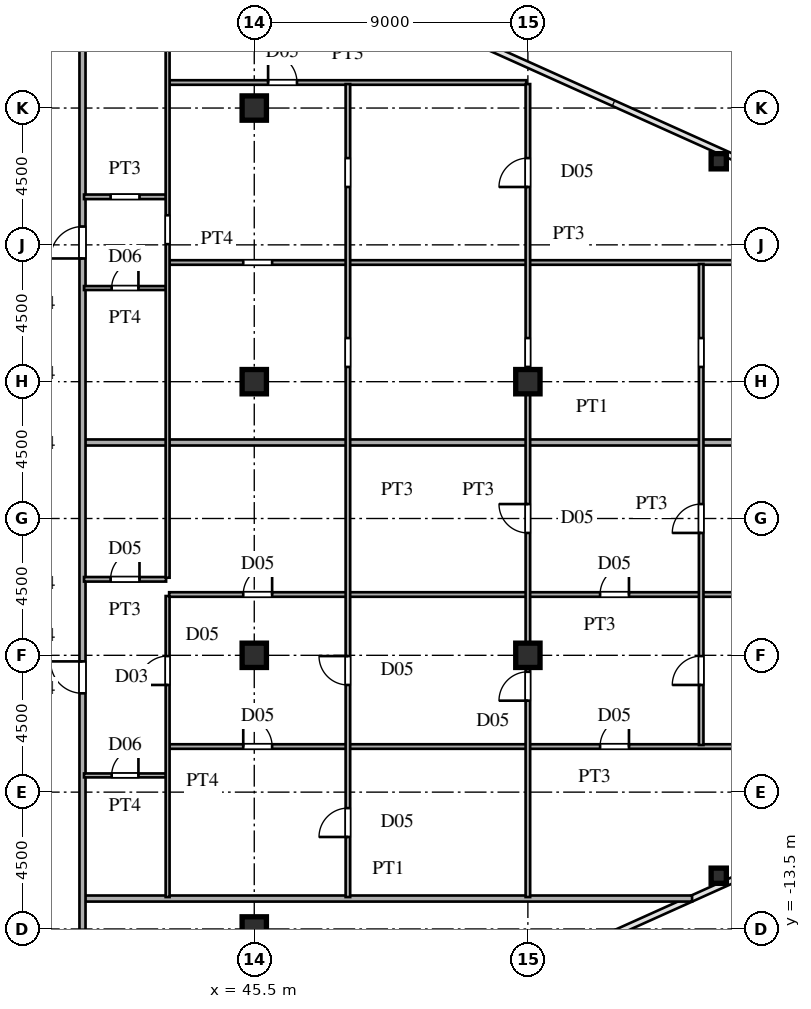
"""IFC4 building model, lengths in metres.
Left out: names, types, materials, properties, quantities, classifications, styles, units other than length and angle.
Written with IfcOpenShell. Run it as: python <this file> out.ifc"""

import sys

from ifc_helpers import new_model, si_unit, direction, frame, frame_2d, origin, origin_2d, place, context, subcontext, project, spatial, rectangle, hollow_rectangle, i_section, extrude, source, transform, mapped, element, fill, save


model = new_model("IFC4")
c1 = context("Model", 3, precision=1e-05, world=origin(), true_north=direction((0.0, 1.0)))
c2 = subcontext(c1, "Body", "Model", "MODEL_VIEW")
j1 = project(units=[si_unit("LENGTHUNIT", "METRE"), si_unit("PLANEANGLEUNIT", "RADIAN")], contexts=[c1])
p1 = place(None, origin())
s1 = spatial("IfcSite", under=j1, at=p1, CompositionType="ELEMENT")
p2 = place(p1, origin())
s2 = spatial("IfcBuilding", under=s1, at=p2, CompositionType="ELEMENT")
p3 = place(p2, frame((0.0, 0.0, 99.6)))
s3 = spatial("IfcBuildingStorey", under=s2, at=p3, CompositionType="ELEMENT", Elevation=99.6)
m1 = source(origin(), c2, "Body", "SweptSolid", [
    extrude(i_section(OverallWidth=0.8, OverallDepth=0.8, WebThickness=0.032, FlangeThickness=0.05, at=origin_2d()), origin(), (0.0, 0.0, 1.0), 3.6),
])
for number, where, z_axis, x_axis in (
    (1, (45.5, -13.5, 0.0), (0.0, 0.0, 1.0), (1.0, 0.0, 0.0)),
    (2, (45.5, -4.5, 0.0), (0.0, 0.0, 1.0), (1.0, 0.0, 0.0)),
    (3, (45.5, 4.5, 0.0), (0.0, 0.0, 1.0), (1.0, 0.0, 0.0)),
    (4, (45.5, 13.5, 0.0), (0.0, 0.0, 1.0), (1.0, 0.0, 0.0)),
    (5, (54.5, -4.5, 0.0), (0.0, 0.0, 1.0), (1.0, 0.0, 0.0)),
    (6, (54.5, 4.5, 0.0), (0.0, 0.0, 1.0), (1.0, 0.0, 0.0)),
):
    element("IfcColumn", number, at=place(p3, frame(where, z_axis=z_axis, x_axis=x_axis)), inside=s3, PredefinedType="COLUMN", context=c2, shape_type="MappedRepresentation", body=[
        mapped(m1, transform((0.0, 0.0, 0.0), scale=1.0)),
    ])
m2 = source(origin(), c2, "Body", "SweptSolid", [
    extrude(hollow_rectangle(XDim=0.5, YDim=0.5, WallThickness=0.02, at=origin_2d()), origin(), (0.0, 0.0, 1.0), 3.6),
])
for number, where, z_axis, x_axis in (
    (7, (60.778, -11.749, 0.0), (0.0, 0.0, 1.0), (1.0, 0.0, 0.0)),
    (8, (60.778, 11.749, 0.0), (0.0, 0.0, 1.0), (1.0, 0.0, 0.0)),
):
    element("IfcColumn", number, at=place(p3, frame(where, z_axis=z_axis, x_axis=x_axis)), inside=s3, PredefinedType="COLUMN", context=c2, shape_type="MappedRepresentation", body=[
        mapped(m2, transform((0.0, 0.0, 0.0), scale=1.0)),
    ])
p4 = place(p3, frame((39.93, -12.5, 0.0), z_axis=(0.0, 0.0, 1.0), x_axis=(1.0, 0.0, 0.0)))
e9 = element("IfcWall", 9, at=p4, inside=s3, PredefinedType="PARTITIONING", context=c2, shape_type="SweptSolid", body=[
    extrude(rectangle(XDim=19.971, YDim=0.2, at=frame_2d((9.985, 0.0))), origin(), (0.0, 0.0, 1.0), 3.38),
])
p5 = place(p3, frame((39.9, -8.45, 0.0), z_axis=(0.0, 0.0, 1.0), x_axis=(1.0, 0.0, 0.0)))
e10 = element("IfcWall", 10, at=p5, inside=s3, PredefinedType="PARTITIONING", context=c2, shape_type="SweptSolid", body=[
    extrude(rectangle(XDim=2.7, YDim=0.13, at=frame_2d((1.35, 0.0))), origin(), (0.0, 0.0, 1.0), 3.38),
])
p6 = place(p5, frame((0.91, 0.0, 0.0)))
e11 = element("IfcOpeningElement", 11, at=p6, cuts=e10, PredefinedType="OPENING", context=c2, shape_type="SweptSolid", body=[
    extrude(rectangle(XDim=0.88, YDim=2.1, at=frame_2d((0.44, 1.05))), frame((0.0, 0.075, 0.0), z_axis=(0.0, -1.0, 0.0), x_axis=(1.0, 0.0, 0.0)), (0.0, 0.0, 1.0), 0.15),
])
p7 = place(p3, frame((42.7, -7.5, 0.0), z_axis=(0.0, 0.0, 1.0), x_axis=(1.0, 0.0, 0.0)))
e12 = element("IfcWall", 12, at=p7, inside=s3, PredefinedType="PARTITIONING", context=c2, shape_type="SweptSolid", body=[
    extrude(rectangle(XDim=27.995, YDim=0.15, at=frame_2d((13.998, 0.0))), origin(), (0.0, 0.0, 1.0), 3.38),
])
p8 = place(p7, frame((2.438, 0.0, 0.0)))
e13 = element("IfcOpeningElement", 13, at=p8, cuts=e12, PredefinedType="OPENING", context=c2, shape_type="SweptSolid", body=[
    extrude(rectangle(XDim=0.95, YDim=2.15, at=frame_2d((0.475, 1.075))), frame((0.0, 0.085, 0.0), z_axis=(0.0, -1.0, 0.0), x_axis=(1.0, 0.0, 0.0)), (0.0, 0.0, 1.0), 0.17),
])
p9 = place(p7, frame((14.175, 0.0, 0.0)))
e14 = element("IfcOpeningElement", 14, at=p9, cuts=e12, PredefinedType="OPENING", context=c2, shape_type="SweptSolid", body=[
    extrude(rectangle(XDim=0.95, YDim=2.15, at=frame_2d((0.475, 1.075))), frame((0.0, 0.085, 0.0), z_axis=(0.0, -1.0, 0.0), x_axis=(1.0, 0.0, 0.0)), (0.0, 0.0, 1.0), 0.17),
])
p10 = place(p3, frame((42.7, -2.5, 0.0), z_axis=(0.0, 0.0, 1.0), x_axis=(1.0, 0.0, 0.0)))
e15 = element("IfcWall", 15, at=p10, inside=s3, PredefinedType="PARTITIONING", context=c2, shape_type="SweptSolid", body=[
    extrude(rectangle(XDim=28.335, YDim=0.15, at=frame_2d((14.167, 0.0))), origin(), (0.0, 0.0, 1.0), 3.38),
])
p11 = place(p10, frame((2.438, 0.0, 0.0)))
e16 = element("IfcOpeningElement", 16, at=p11, cuts=e15, PredefinedType="OPENING", context=c2, shape_type="SweptSolid", body=[
    extrude(rectangle(XDim=0.95, YDim=2.15, at=frame_2d((0.475, 1.075))), frame((0.0, 0.085, 0.0), z_axis=(0.0, -1.0, 0.0), x_axis=(1.0, 0.0, 0.0)), (0.0, 0.0, 1.0), 0.17),
])
p12 = place(p10, frame((14.175, 0.0, 0.0)))
e17 = element("IfcOpeningElement", 17, at=p12, cuts=e15, PredefinedType="OPENING", context=c2, shape_type="SweptSolid", body=[
    extrude(rectangle(XDim=0.95, YDim=2.15, at=frame_2d((0.475, 1.075))), frame((0.0, 0.085, 0.0), z_axis=(0.0, -1.0, 0.0), x_axis=(1.0, 0.0, 0.0)), (0.0, 0.0, 1.0), 0.17),
])
p13 = place(p3, frame((39.9, -2.0, 0.0), z_axis=(0.0, 0.0, 1.0), x_axis=(1.0, 0.0, 0.0)))
e18 = element("IfcWall", 18, at=p13, inside=s3, PredefinedType="PARTITIONING", context=c2, shape_type="SweptSolid", body=[
    extrude(rectangle(XDim=2.7, YDim=0.15, at=frame_2d((1.35, 0.0))), origin(), (0.0, 0.0, 1.0), 3.38),
])
p14 = place(p13, frame((0.875, 0.0, 0.0)))
e19 = element("IfcOpeningElement", 19, at=p14, cuts=e18, PredefinedType="OPENING", context=c2, shape_type="SweptSolid", body=[
    extrude(rectangle(XDim=0.95, YDim=2.15, at=frame_2d((0.475, 1.075))), frame((0.0, 0.085, 0.0), z_axis=(0.0, -1.0, 0.0), x_axis=(1.0, 0.0, 0.0)), (0.0, 0.0, 1.0), 0.17),
])
p15 = place(p3, frame((39.93, 2.5, 0.0), z_axis=(0.0, 0.0, 1.0), x_axis=(1.0, 0.0, 0.0)))
e20 = element("IfcWall", 20, at=p15, inside=s3, PredefinedType="PARTITIONING", context=c2, shape_type="SweptSolid", body=[
    extrude(rectangle(XDim=31.075, YDim=0.2, at=frame_2d((15.538, 0.0))), origin(), (0.0, 0.0, 1.0), 3.38),
])
p16 = place(p3, frame((39.9, 7.58, 0.0), z_axis=(0.0, 0.0, 1.0), x_axis=(1.0, 0.0, 0.0)))
e21 = element("IfcWall", 21, at=p16, inside=s3, PredefinedType="PARTITIONING", context=c2, shape_type="SweptSolid", body=[
    extrude(rectangle(XDim=2.7, YDim=0.13, at=frame_2d((1.35, 0.0))), origin(), (0.0, 0.0, 1.0), 3.38),
])
p17 = place(p16, frame((0.91, 0.0, 0.0)))
e22 = element("IfcOpeningElement", 22, at=p17, cuts=e21, PredefinedType="OPENING", context=c2, shape_type="SweptSolid", body=[
    extrude(rectangle(XDim=0.88, YDim=2.1, at=frame_2d((0.44, 1.05))), frame((0.0, 0.075, 0.0), z_axis=(0.0, -1.0, 0.0), x_axis=(1.0, 0.0, 0.0)), (0.0, 0.0, 1.0), 0.15),
])
p18 = place(p3, frame((42.7, 8.42, 0.0), z_axis=(0.0, 0.0, 1.0), x_axis=(1.0, 0.0, 0.0)))
e23 = element("IfcWall", 23, at=p18, inside=s3, PredefinedType="PARTITIONING", context=c2, shape_type="SweptSolid", body=[
    extrude(rectangle(XDim=26.292, YDim=0.15, at=frame_2d((13.146, 0.0))), origin(), (0.0, 0.0, 1.0), 3.38),
])
p19 = place(p18, frame((2.438, 0.0, 0.0)))
e24 = element("IfcOpeningElement", 24, at=p19, cuts=e23, PredefinedType="OPENING", context=c2, shape_type="SweptSolid", body=[
    extrude(rectangle(XDim=0.95, YDim=2.15, at=frame_2d((0.475, 1.075))), frame((0.0, 0.085, 0.0), z_axis=(0.0, -1.0, 0.0), x_axis=(1.0, 0.0, 0.0)), (0.0, 0.0, 1.0), 0.17),
])
p20 = place(p3, frame((39.9, 10.58, 0.0), z_axis=(0.0, 0.0, 1.0), x_axis=(1.0, 0.0, 0.0)))
e25 = element("IfcWall", 25, at=p20, inside=s3, PredefinedType="PARTITIONING", context=c2, shape_type="SweptSolid", body=[
    extrude(rectangle(XDim=2.7, YDim=0.15, at=frame_2d((1.35, 0.0))), origin(), (0.0, 0.0, 1.0), 3.38),
])
p21 = place(p20, frame((0.875, 0.0, 0.0)))
e26 = element("IfcOpeningElement", 26, at=p21, cuts=e25, PredefinedType="OPENING", context=c2, shape_type="SweptSolid", body=[
    extrude(rectangle(XDim=0.95, YDim=2.15, at=frame_2d((0.475, 1.075))), frame((0.0, 0.085, 0.0), z_axis=(0.0, -1.0, 0.0), x_axis=(1.0, 0.0, 0.0)), (0.0, 0.0, 1.0), 0.17),
])
p22 = place(p3, frame((42.7, 14.34, 0.0), z_axis=(0.0, 0.0, 1.0), x_axis=(1.0, 0.0, 0.0)))
e27 = element("IfcWall", 27, at=p22, inside=s3, PredefinedType="PARTITIONING", context=c2, shape_type="SweptSolid", body=[
    extrude(rectangle(XDim=11.75, YDim=0.15, at=frame_2d((5.875, 0.0))), origin(), (0.0, 0.0, 1.0), 3.38),
])
p23 = place(p22, frame((3.255, 0.0, 0.0)))
e28 = element("IfcOpeningElement", 28, at=p23, cuts=e27, PredefinedType="OPENING", context=c2, shape_type="SweptSolid", body=[
    extrude(rectangle(XDim=0.95, YDim=2.15, at=frame_2d((0.475, 1.075))), frame((0.0, 0.085, 0.0), z_axis=(0.0, -1.0, 0.0), x_axis=(1.0, 0.0, 0.0)), (0.0, 0.0, 1.0), 0.17),
])
p24 = place(p3, frame((39.85, -15.515, 0.0), z_axis=(0.0, 0.0, 1.0), x_axis=(0.0, 1.0, 0.0)))
e29 = element("IfcWall", 29, at=p24, inside=s3, PredefinedType="PARTITIONING", context=c2, shape_type="SweptSolid", body=[
    extrude(rectangle(XDim=31.03, YDim=0.2, at=frame_2d((15.515, 0.0))), origin(), (0.0, 0.0, 1.0), 3.38),
])
p25 = place(p24, frame((0.94, 0.0, 0.0)))
e30 = element("IfcOpeningElement", 30, at=p25, cuts=e29, PredefinedType="OPENING", context=c2, shape_type="SweptSolid", body=[
    extrude(rectangle(XDim=1.05, YDim=2.25, at=frame_2d((0.525, 1.125))), frame((0.0, 0.11, 0.0), z_axis=(0.0, -1.0, 0.0), x_axis=(1.0, 0.0, 0.0)), (0.0, 0.0, 1.0), 0.22),
])
p26 = place(p24, frame((9.765, 0.0, 0.0)))
e31 = element("IfcOpeningElement", 31, at=p26, cuts=e29, PredefinedType="OPENING", context=c2, shape_type="SweptSolid", body=[
    extrude(rectangle(XDim=1.05, YDim=2.25, at=frame_2d((0.525, 1.125))), frame((0.0, 0.11, 0.0), z_axis=(0.0, -1.0, 0.0), x_axis=(1.0, 0.0, 0.0)), (0.0, 0.0, 1.0), 0.22),
])
p27 = place(p24, frame((24.067, 0.0, 0.0)))
e32 = element("IfcOpeningElement", 32, at=p27, cuts=e29, PredefinedType="OPENING", context=c2, shape_type="SweptSolid", body=[
    extrude(rectangle(XDim=1.05, YDim=2.25, at=frame_2d((0.525, 1.125))), frame((0.0, 0.11, 0.0), z_axis=(0.0, -1.0, 0.0), x_axis=(1.0, 0.0, 0.0)), (0.0, 0.0, 1.0), 0.22),
])
p28 = place(p3, frame((42.65, -12.45, 0.0), z_axis=(0.0, 0.0, 1.0), x_axis=(0.0, 1.0, 0.0)))
e33 = element("IfcWall", 33, at=p28, inside=s3, PredefinedType="PARTITIONING", context=c2, shape_type="SweptSolid", body=[
    extrude(rectangle(XDim=9.9, YDim=0.13, at=frame_2d((4.95, 0.0))), origin(), (0.0, 0.0, 1.0), 3.38),
])
p29 = place(p28, frame((6.975, 0.0, 0.0)))
e34 = element("IfcOpeningElement", 34, at=p29, cuts=e33, PredefinedType="OPENING", context=c2, shape_type="SweptSolid", body=[
    extrude(rectangle(XDim=0.95, YDim=2.15, at=frame_2d((0.475, 1.075))), frame((0.0, 0.075, 0.0), z_axis=(0.0, -1.0, 0.0), x_axis=(1.0, 0.0, 0.0)), (0.0, 0.0, 1.0), 0.15),
])
p30 = place(p3, frame((42.65, -1.948, 0.0), z_axis=(0.0, 0.0, 1.0), x_axis=(0.0, 1.0, 0.0)))
e35 = element("IfcWall", 35, at=p30, inside=s3, PredefinedType="PARTITIONING", context=c2, shape_type="SweptSolid", body=[
    extrude(rectangle(XDim=22.241, YDim=0.13, at=frame_2d((11.121, 0.0))), origin(), (0.0, 0.0, 1.0), 3.38),
])
p31 = place(p30, frame((10.971, 0.0, 0.0)))
e36 = element("IfcOpeningElement", 36, at=p31, cuts=e35, PredefinedType="OPENING", context=c2, shape_type="SweptSolid", body=[
    extrude(rectangle(XDim=0.95, YDim=2.15, at=frame_2d((0.475, 1.075))), frame((0.0, 0.075, 0.0), z_axis=(0.0, -1.0, 0.0), x_axis=(1.0, 0.0, 0.0)), (0.0, 0.0, 1.0), 0.15),
])
p32 = place(p3, frame((48.58, -12.45, 0.0), z_axis=(0.0, 0.0, 1.0), x_axis=(0.0, 1.0, 0.0)))
e37 = element("IfcWall", 37, at=p32, inside=s3, PredefinedType="PARTITIONING", context=c2, shape_type="SweptSolid", body=[
    extrude(rectangle(XDim=26.738, YDim=0.15, at=frame_2d((13.369, 0.0))), origin(), (0.0, 0.0, 1.0), 3.38),
])
p33 = place(p32, frame((6.975, 0.0, 0.0)))
e38 = element("IfcOpeningElement", 38, at=p33, cuts=e37, PredefinedType="OPENING", context=c2, shape_type="SweptSolid", body=[
    extrude(rectangle(XDim=0.95, YDim=2.15, at=frame_2d((0.475, 1.075))), frame((0.0, 0.085, 0.0), z_axis=(0.0, -1.0, 0.0), x_axis=(1.0, 0.0, 0.0)), (0.0, 0.0, 1.0), 0.17),
])
p34 = place(p32, frame((1.975, 0.0, 0.0)))
e39 = element("IfcOpeningElement", 39, at=p34, cuts=e37, PredefinedType="OPENING", context=c2, shape_type="SweptSolid", body=[
    extrude(rectangle(XDim=0.95, YDim=2.15, at=frame_2d((0.475, 1.075))), frame((0.0, 0.085, 0.0), z_axis=(0.0, -1.0, 0.0), x_axis=(1.0, 0.0, 0.0)), (0.0, 0.0, 1.0), 0.17),
])
p35 = place(p32, frame((23.354, 0.0, 0.0)))
e40 = element("IfcOpeningElement", 40, at=p35, cuts=e37, PredefinedType="OPENING", context=c2, shape_type="SweptSolid", body=[
    extrude(rectangle(XDim=0.95, YDim=2.15, at=frame_2d((0.475, 1.075))), frame((0.0, 0.085, 0.0), z_axis=(0.0, -1.0, 0.0), x_axis=(1.0, 0.0, 0.0)), (0.0, 0.0, 1.0), 0.17),
])
p36 = place(p32, frame((17.435, 0.0, 0.0)))
e41 = element("IfcOpeningElement", 41, at=p36, cuts=e37, PredefinedType="OPENING", context=c2, shape_type="SweptSolid", body=[
    extrude(rectangle(XDim=0.95, YDim=2.15, at=frame_2d((0.475, 1.075))), frame((0.0, 0.085, 0.0), z_axis=(0.0, -1.0, 0.0), x_axis=(1.0, 0.0, 0.0)), (0.0, 0.0, 1.0), 0.17),
])
p37 = place(p3, frame((54.5, -12.45, 0.0), z_axis=(0.0, 0.0, 1.0), x_axis=(0.0, 1.0, 0.0)))
e42 = element("IfcWall", 42, at=p37, inside=s3, PredefinedType="PARTITIONING", context=c2, shape_type="SweptSolid", body=[
    extrude(rectangle(XDim=26.738, YDim=0.15, at=frame_2d((13.369, 0.0))), origin(), (0.0, 0.0, 1.0), 2.68),
])
p38 = place(p37, frame((6.458, 0.0, 0.0)))
e43 = element("IfcOpeningElement", 43, at=p38, cuts=e42, PredefinedType="OPENING", context=c2, shape_type="SweptSolid", body=[
    extrude(rectangle(XDim=0.95, YDim=2.15, at=frame_2d((0.475, 1.075))), frame((0.0, 0.085, 0.0), z_axis=(0.0, -1.0, 0.0), x_axis=(1.0, 0.0, 0.0)), (0.0, 0.0, 1.0), 0.17),
])
p39 = place(p37, frame((11.975, 0.0, 0.0)))
e44 = element("IfcOpeningElement", 44, at=p39, cuts=e42, PredefinedType="OPENING", context=c2, shape_type="SweptSolid", body=[
    extrude(rectangle(XDim=0.95, YDim=2.15, at=frame_2d((0.475, 1.075))), frame((0.0, 0.085, 0.0), z_axis=(0.0, -1.0, 0.0), x_axis=(1.0, 0.0, 0.0)), (0.0, 0.0, 1.0), 0.17),
])
p40 = place(p37, frame((23.354, 0.0, 0.0)))
e45 = element("IfcOpeningElement", 45, at=p40, cuts=e42, PredefinedType="OPENING", context=c2, shape_type="SweptSolid", body=[
    extrude(rectangle(XDim=0.95, YDim=2.15, at=frame_2d((0.475, 1.075))), frame((0.0, 0.085, 0.0), z_axis=(0.0, -1.0, 0.0), x_axis=(1.0, 0.0, 0.0)), (0.0, 0.0, 1.0), 0.17),
])
p41 = place(p37, frame((17.435, 0.0, 0.0)))
e46 = element("IfcOpeningElement", 46, at=p41, cuts=e42, PredefinedType="OPENING", context=c2, shape_type="SweptSolid", body=[
    extrude(rectangle(XDim=0.95, YDim=2.15, at=frame_2d((0.475, 1.075))), frame((0.0, 0.085, 0.0), z_axis=(0.0, -1.0, 0.0), x_axis=(1.0, 0.0, 0.0)), (0.0, 0.0, 1.0), 0.17),
])
p42 = place(p3, frame((60.2, -7.45, 0.0), z_axis=(0.0, 0.0, 1.0), x_axis=(0.0, 1.0, 0.0)))
e47 = element("IfcWall", 47, at=p42, inside=s3, PredefinedType="PARTITIONING", context=c2, shape_type="SweptSolid", body=[
    extrude(rectangle(XDim=15.819, YDim=0.15, at=frame_2d((7.909, 0.0))), origin(), (0.0, 0.0, 1.0), 3.38),
])
p43 = place(p42, frame((1.975, 0.0, 0.0)))
e48 = element("IfcOpeningElement", 48, at=p43, cuts=e47, PredefinedType="OPENING", context=c2, shape_type="SweptSolid", body=[
    extrude(rectangle(XDim=0.95, YDim=2.15, at=frame_2d((0.475, 1.075))), frame((0.0, 0.085, 0.0), z_axis=(0.0, -1.0, 0.0), x_axis=(1.0, 0.0, 0.0)), (0.0, 0.0, 1.0), 0.17),
])
p44 = place(p42, frame((6.975, 0.0, 0.0)))
e49 = element("IfcOpeningElement", 49, at=p44, cuts=e47, PredefinedType="OPENING", context=c2, shape_type="SweptSolid", body=[
    extrude(rectangle(XDim=0.95, YDim=2.15, at=frame_2d((0.475, 1.075))), frame((0.0, 0.085, 0.0), z_axis=(0.0, -1.0, 0.0), x_axis=(1.0, 0.0, 0.0)), (0.0, 0.0, 1.0), 0.17),
])
p45 = place(p42, frame((12.435, 0.0, 0.0)))
e50 = element("IfcOpeningElement", 50, at=p45, cuts=e47, PredefinedType="OPENING", context=c2, shape_type="SweptSolid", body=[
    extrude(rectangle(XDim=0.95, YDim=2.15, at=frame_2d((0.475, 1.075))), frame((0.0, 0.085, 0.0), z_axis=(0.0, -1.0, 0.0), x_axis=(1.0, 0.0, 0.0)), (0.0, 0.0, 1.0), 0.17),
])
m3 = source(origin(), c2, "Body", "SweptSolid", [
    extrude(rectangle(XDim=0.88, YDim=2.1, at=frame_2d((0.44, 1.05))), frame((0.0, 0.025, 0.0), z_axis=(0.0, -1.0, 0.0), x_axis=(1.0, 0.0, 0.0)), (0.0, 0.0, 1.0), 0.05),
])
p46 = place(p6, origin())
e51 = element("IfcDoor", 51, at=p46, inside=s3, OperationType="SINGLE_SWING_RIGHT", PredefinedType="DOOR", context=c2, shape_type="MappedRepresentation", body=[
    mapped(m3, transform((0.0, 0.0, 0.0), scale=1.0)),
])
fill(e11, e51)
m4 = source(origin(), c2, "Body", "SweptSolid", [
    extrude(rectangle(XDim=0.95, YDim=2.15, at=frame_2d((0.475, 1.075))), frame((0.0, 0.025, 0.0), z_axis=(0.0, -1.0, 0.0), x_axis=(1.0, 0.0, 0.0)), (0.0, 0.0, 1.0), 0.05),
])
p47 = place(p8, origin())
e52 = element("IfcDoor", 52, at=p47, inside=s3, OperationType="SINGLE_SWING_LEFT", PredefinedType="DOOR", context=c2, shape_type="MappedRepresentation", body=[
    mapped(m4, transform((0.0, 0.0, 0.0), scale=1.0)),
])
fill(e13, e52)
p48 = place(p9, origin())
e53 = element("IfcDoor", 53, at=p48, inside=s3, OperationType="SINGLE_SWING_RIGHT", PredefinedType="DOOR", context=c2, shape_type="MappedRepresentation", body=[
    mapped(m4, transform((0.0, 0.0, 0.0), scale=1.0)),
])
fill(e14, e53)
p49 = place(p11, origin())
e54 = element("IfcDoor", 54, at=p49, inside=s3, OperationType="SINGLE_SWING_RIGHT", PredefinedType="DOOR", context=c2, shape_type="MappedRepresentation", body=[
    mapped(m4, transform((0.0, 0.0, 0.0), scale=1.0)),
])
fill(e16, e54)
p50 = place(p12, origin())
e55 = element("IfcDoor", 55, at=p50, inside=s3, OperationType="SINGLE_SWING_RIGHT", PredefinedType="DOOR", context=c2, shape_type="MappedRepresentation", body=[
    mapped(m4, transform((0.0, 0.0, 0.0), scale=1.0)),
])
fill(e17, e55)
p51 = place(p14, origin())
e56 = element("IfcDoor", 56, at=p51, inside=s3, OperationType="SINGLE_SWING_RIGHT", PredefinedType="DOOR", context=c2, shape_type="MappedRepresentation", body=[
    mapped(m4, transform((0.0, 0.0, 0.0), scale=1.0)),
])
fill(e19, e56)
p52 = place(p17, origin())
e57 = element("IfcDoor", 57, at=p52, inside=s3, OperationType="SINGLE_SWING_RIGHT", PredefinedType="DOOR", context=c2, shape_type="MappedRepresentation", body=[
    mapped(m3, transform((0.0, 0.0, 0.0), scale=1.0)),
])
fill(e22, e57)
p53 = place(p23, origin())
e58 = element("IfcDoor", 58, at=p53, inside=s3, OperationType="SINGLE_SWING_LEFT", PredefinedType="DOOR", context=c2, shape_type="MappedRepresentation", body=[
    mapped(m4, transform((0.0, 0.0, 0.0), scale=1.0)),
])
fill(e28, e58)
m5 = source(origin(), c2, "Body", "SweptSolid", [
    extrude(rectangle(XDim=1.05, YDim=2.25, at=frame_2d((0.525, 1.125))), frame((0.0, 0.025, 0.0), z_axis=(0.0, -1.0, 0.0), x_axis=(1.0, 0.0, 0.0)), (0.0, 0.0, 1.0), 0.05),
])
p54 = place(p26, origin())
e59 = element("IfcDoor", 59, at=p54, inside=s3, OperationType="SINGLE_SWING_RIGHT", PredefinedType="DOOR", context=c2, shape_type="MappedRepresentation", body=[
    mapped(m5, transform((0.0, 0.0, 0.0), scale=1.0)),
])
fill(e31, e59)
p55 = place(p27, origin())
e60 = element("IfcDoor", 60, at=p55, inside=s3, OperationType="SINGLE_SWING_LEFT", PredefinedType="DOOR", context=c2, shape_type="MappedRepresentation", body=[
    mapped(m5, transform((0.0, 0.0, 0.0), scale=1.0)),
])
fill(e32, e60)
p56 = place(p29, origin())
e61 = element("IfcDoor", 61, at=p56, inside=s3, OperationType="SINGLE_SWING_LEFT", PredefinedType="DOOR", context=c2, shape_type="MappedRepresentation", body=[
    mapped(m4, transform((0.0, 0.0, 0.0), scale=1.0)),
])
fill(e34, e61)
p57 = place(p33, origin())
e62 = element("IfcDoor", 62, at=p57, inside=s3, OperationType="SINGLE_SWING_RIGHT", PredefinedType="DOOR", context=c2, shape_type="MappedRepresentation", body=[
    mapped(m4, transform((0.0, 0.0, 0.0), scale=1.0)),
])
fill(e38, e62)
p58 = place(p34, origin())
e63 = element("IfcDoor", 63, at=p58, inside=s3, OperationType="SINGLE_SWING_LEFT", PredefinedType="DOOR", context=c2, shape_type="MappedRepresentation", body=[
    mapped(m4, transform((0.0, 0.0, 0.0), scale=1.0)),
])
fill(e39, e63)
p59 = place(p38, origin())
e64 = element("IfcDoor", 64, at=p59, inside=s3, OperationType="SINGLE_SWING_LEFT", PredefinedType="DOOR", context=c2, shape_type="MappedRepresentation", body=[
    mapped(m4, transform((0.0, 0.0, 0.0), scale=1.0)),
])
fill(e43, e64)
p60 = place(p39, origin())
e65 = element("IfcDoor", 65, at=p60, inside=s3, OperationType="SINGLE_SWING_RIGHT", PredefinedType="DOOR", context=c2, shape_type="MappedRepresentation", body=[
    mapped(m4, transform((0.0, 0.0, 0.0), scale=1.0)),
])
fill(e44, e65)
p61 = place(p40, origin())
e66 = element("IfcDoor", 66, at=p61, inside=s3, OperationType="SINGLE_SWING_LEFT", PredefinedType="DOOR", context=c2, shape_type="MappedRepresentation", body=[
    mapped(m4, transform((0.0, 0.0, 0.0), scale=1.0)),
])
fill(e45, e66)
p62 = place(p43, origin())
e67 = element("IfcDoor", 67, at=p62, inside=s3, OperationType="SINGLE_SWING_LEFT", PredefinedType="DOOR", context=c2, shape_type="MappedRepresentation", body=[
    mapped(m4, transform((0.0, 0.0, 0.0), scale=1.0)),
])
fill(e48, e67)
p63 = place(p44, origin())
e68 = element("IfcDoor", 68, at=p63, inside=s3, OperationType="SINGLE_SWING_LEFT", PredefinedType="DOOR", context=c2, shape_type="MappedRepresentation", body=[
    mapped(m4, transform((0.0, 0.0, 0.0), scale=1.0)),
])
fill(e49, e68)
save(model, sys.argv[1])
